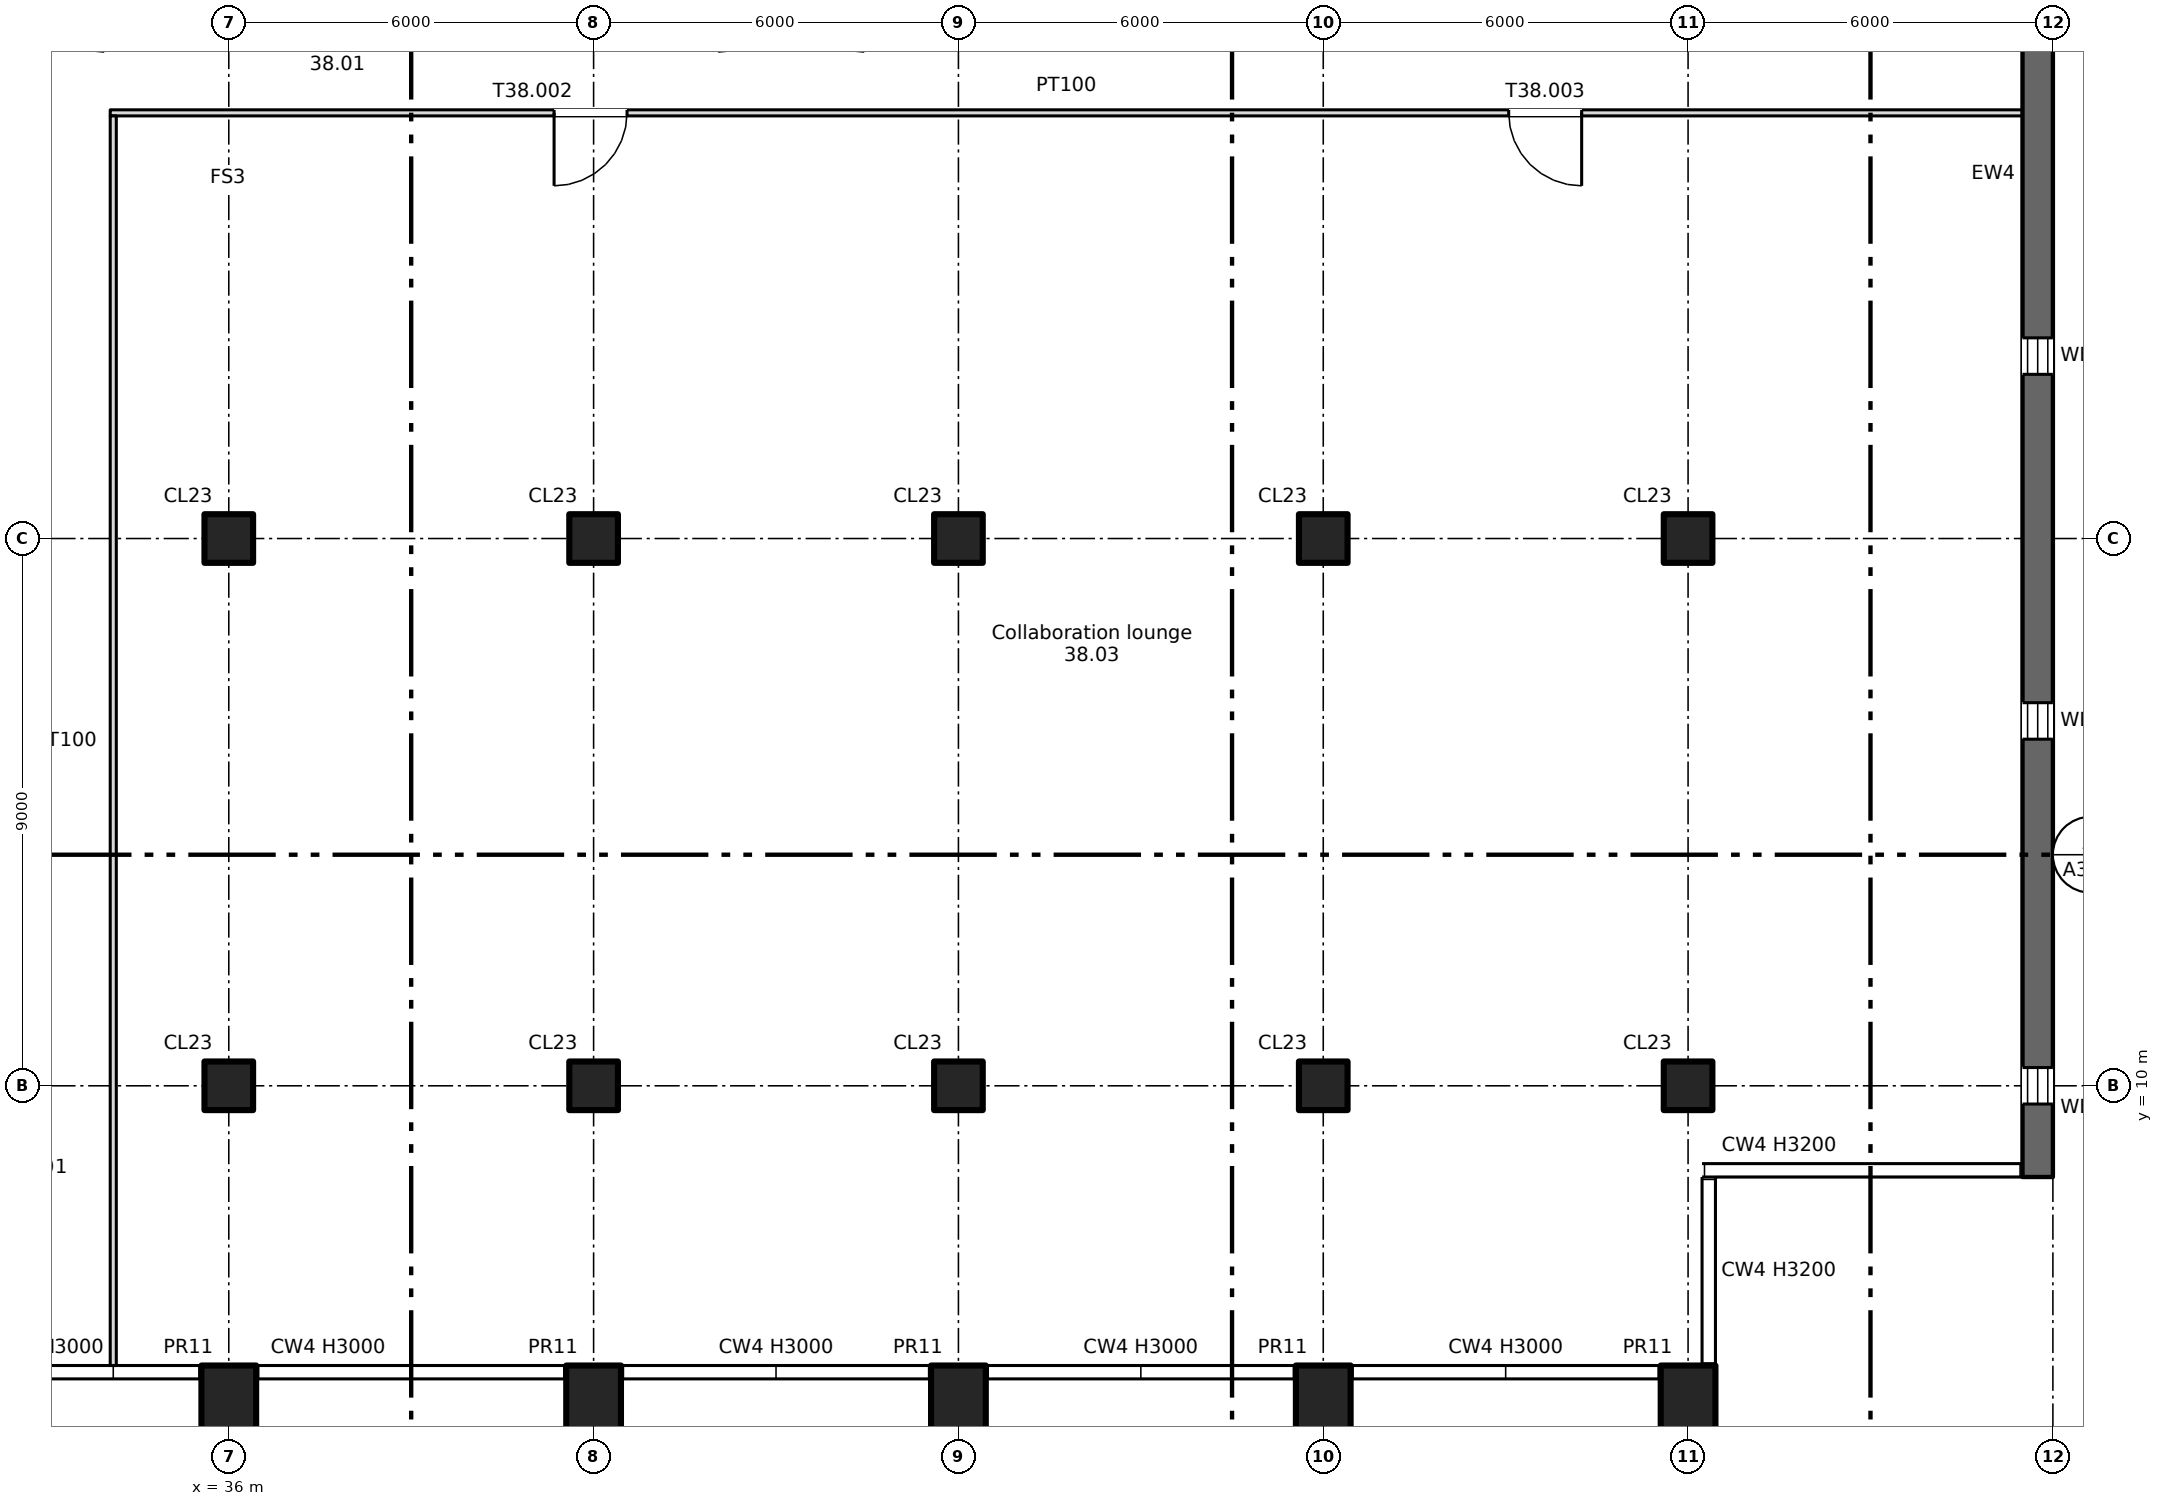
"""IFC4 building model, lengths in metres.
Left out: names, types, materials, properties, quantities, classifications, styles, units other than length and angle.
Written with IfcOpenShell. Run it as: python <this file> out.ifc"""

import sys

from ifc_helpers import new_model, si_unit, direction, frame, frame_2d, origin, origin_2d, place, context, subcontext, project, spatial, rectangle, extrude, element, fill, save


model = new_model("IFC4")
c1 = context("Model", 3, precision=1e-05, world=origin(), true_north=direction((0.0, 1.0)))
c2 = subcontext(c1, "Body", "Model", "MODEL_VIEW")
j1 = project(units=[si_unit("LENGTHUNIT", "METRE"), si_unit("PLANEANGLEUNIT", "RADIAN")], contexts=[c1])
p1 = place(None, origin())
s1 = spatial("IfcSite", under=j1, at=p1, CompositionType="ELEMENT")
p2 = place(p1, origin())
s2 = spatial("IfcBuilding", under=s1, at=p2, CompositionType="ELEMENT")
p3 = place(p2, frame((0.0, 0.0, 262.15)))
s3 = spatial("IfcBuildingStorey", under=s2, at=p3, CompositionType="ELEMENT", Elevation=262.15)
for number, where, z_axis, x_axis in (
    (1, (36.0, 4.7, -0.4), (0.0, 0.0, 1.0), (1.0, 0.0, 0.0)),
    (2, (42.0, 4.7, -0.4), (0.0, 0.0, 1.0), (1.0, 0.0, 0.0)),
    (3, (48.0, 4.7, -0.4), (0.0, 0.0, 1.0), (1.0, 0.0, 0.0)),
    (4, (54.0, 4.7, -0.4), (0.0, 0.0, 1.0), (1.0, 0.0, 0.0)),
    (5, (60.0, 4.7, -0.4), (0.0, 0.0, 1.0), (1.0, 0.0, 0.0)),
):
    element("IfcColumn", number, at=place(p3, frame(where, z_axis=z_axis, x_axis=x_axis)), inside=s3, PredefinedType="COLUMN", context=c2, shape_type="SweptSolid", body=[
        extrude(rectangle(XDim=0.9, YDim=1.4, at=origin_2d()), origin(), (0.0, 0.0, 1.0), 3.6),
    ])
for number, where, z_axis, x_axis in (
    (6, (36.0, 10.0, 0.0), (0.0, 0.0, 1.0), (1.0, 0.0, 0.0)),
    (7, (36.0, 19.0, 0.0), (0.0, 0.0, 1.0), (1.0, 0.0, 0.0)),
    (8, (42.0, 10.0, 0.0), (0.0, 0.0, 1.0), (1.0, 0.0, 0.0)),
    (9, (42.0, 19.0, 0.0), (0.0, 0.0, 1.0), (1.0, 0.0, 0.0)),
    (10, (48.0, 10.0, 0.0), (0.0, 0.0, 1.0), (1.0, 0.0, 0.0)),
    (11, (48.0, 19.0, 0.0), (0.0, 0.0, 1.0), (1.0, 0.0, 0.0)),
    (12, (54.0, 10.0, 0.0), (0.0, 0.0, 1.0), (1.0, 0.0, 0.0)),
    (13, (54.0, 19.0, 0.0), (0.0, 0.0, 1.0), (1.0, 0.0, 0.0)),
    (14, (60.0, 10.0, 0.0), (0.0, 0.0, 1.0), (1.0, 0.0, 0.0)),
    (15, (60.0, 19.0, 0.0), (0.0, 0.0, 1.0), (1.0, 0.0, 0.0)),
):
    element("IfcColumn", number, at=place(p3, frame(where, z_axis=z_axis, x_axis=x_axis)), inside=s3, PredefinedType="COLUMN", context=c2, shape_type="SweptSolid", body=[
        extrude(rectangle(XDim=0.8, YDim=0.8, at=origin_2d()), origin(), (0.0, 0.0, 1.0), 3.2),
    ])
p4 = place(p3, frame((65.75, 8.5, 0.0), z_axis=(0.0, 0.0, 1.0), x_axis=(0.0, 1.0, 0.0)))
e16 = element("IfcWall", 16, at=p4, inside=s3, PredefinedType="SHEAR", context=c2, shape_type="SweptSolid", body=[
    extrude(rectangle(XDim=33.0, YDim=0.5, at=frame_2d((16.5, 0.0))), origin(), (0.0, 0.0, 1.0), 3.2),
])
p5 = place(p4, frame((1.2, 0.0, 0.6)))
e17 = element("IfcOpeningElement", 17, at=p5, cuts=e16, PredefinedType="OPENING", context=c2, shape_type="SweptSolid", body=[
    extrude(rectangle(XDim=0.6, YDim=2.4, at=frame_2d((0.3, 1.2))), frame((0.0, 0.26, 0.0), z_axis=(0.0, -1.0, 0.0), x_axis=(1.0, 0.0, 0.0)), (0.0, 0.0, 1.0), 0.52),
])
p6 = place(p4, frame((7.2, 0.0, 0.6)))
e18 = element("IfcOpeningElement", 18, at=p6, cuts=e16, PredefinedType="OPENING", context=c2, shape_type="SweptSolid", body=[
    extrude(rectangle(XDim=0.6, YDim=2.4, at=frame_2d((0.3, 1.2))), frame((0.0, 0.26, 0.0), z_axis=(0.0, -1.0, 0.0), x_axis=(1.0, 0.0, 0.0)), (0.0, 0.0, 1.0), 0.52),
])
p7 = place(p4, frame((13.2, 0.0, 0.6)))
e19 = element("IfcOpeningElement", 19, at=p7, cuts=e16, PredefinedType="OPENING", context=c2, shape_type="SweptSolid", body=[
    extrude(rectangle(XDim=0.6, YDim=2.4, at=frame_2d((0.3, 1.2))), frame((0.0, 0.26, 0.0), z_axis=(0.0, -1.0, 0.0), x_axis=(1.0, 0.0, 0.0)), (0.0, 0.0, 1.0), 0.52),
])
p8 = place(p3, frame((34.05, 26.0, 0.0), z_axis=(0.0, 0.0, 1.0), x_axis=(1.0, 0.0, 0.0)))
e20 = element("IfcWall", 20, at=p8, inside=s3, PredefinedType="PARTITIONING", context=c2, shape_type="SweptSolid", body=[
    extrude(rectangle(XDim=31.45, YDim=0.1, at=frame_2d((15.725, 0.0))), origin(), (0.0, 0.0, 1.0), 3.2),
])
p9 = place(p8, frame((7.3, 0.0, 0.0)))
e21 = element("IfcOpeningElement", 21, at=p9, cuts=e20, PredefinedType="OPENING", context=c2, shape_type="SweptSolid", body=[
    extrude(rectangle(XDim=1.2, YDim=2.1, at=frame_2d((0.6, 1.05))), frame((0.0, 0.06, 0.0), z_axis=(0.0, -1.0, 0.0), x_axis=(1.0, 0.0, 0.0)), (0.0, 0.0, 1.0), 0.12),
])
p10 = place(p8, frame((23.0, 0.0, 0.0)))
e22 = element("IfcOpeningElement", 22, at=p10, cuts=e20, PredefinedType="OPENING", context=c2, shape_type="SweptSolid", body=[
    extrude(rectangle(XDim=1.2, YDim=2.1, at=frame_2d((0.6, 1.05))), frame((0.0, 0.06, 0.0), z_axis=(0.0, -1.0, 0.0), x_axis=(1.0, 0.0, 0.0)), (0.0, 0.0, 1.0), 0.12),
])
p11 = place(p3, frame((34.1, 5.4, 0.0), z_axis=(0.0, 0.0, 1.0), x_axis=(0.0, 1.0, 0.0)))
e23 = element("IfcWall", 23, at=p11, inside=s3, PredefinedType="PARTITIONING", context=c2, shape_type="SweptSolid", body=[
    extrude(rectangle(XDim=20.55, YDim=0.1, at=frame_2d((10.275, 0.0))), origin(), (0.0, 0.0, 1.0), 3.2),
])
p12 = place(p5, origin())
e24 = element("IfcWindow", 24, at=p12, inside=s3, PartitioningType="SINGLE_PANEL", PredefinedType="WINDOW", context=c2, shape_type="SweptSolid", body=[
    extrude(rectangle(XDim=0.6, YDim=2.4, at=frame_2d((0.3, 1.2))), frame((0.0, 0.03, 0.0), z_axis=(0.0, -1.0, 0.0), x_axis=(1.0, 0.0, 0.0)), (0.0, 0.0, 1.0), 0.06),
])
fill(e17, e24)
p13 = place(p6, origin())
e25 = element("IfcWindow", 25, at=p13, inside=s3, PartitioningType="SINGLE_PANEL", PredefinedType="WINDOW", context=c2, shape_type="SweptSolid", body=[
    extrude(rectangle(XDim=0.6, YDim=2.4, at=frame_2d((0.3, 1.2))), frame((0.0, 0.03, 0.0), z_axis=(0.0, -1.0, 0.0), x_axis=(1.0, 0.0, 0.0)), (0.0, 0.0, 1.0), 0.06),
])
fill(e18, e25)
p14 = place(p7, origin())
e26 = element("IfcWindow", 26, at=p14, inside=s3, PartitioningType="SINGLE_PANEL", PredefinedType="WINDOW", context=c2, shape_type="SweptSolid", body=[
    extrude(rectangle(XDim=0.6, YDim=2.4, at=frame_2d((0.3, 1.2))), frame((0.0, 0.03, 0.0), z_axis=(0.0, -1.0, 0.0), x_axis=(1.0, 0.0, 0.0)), (0.0, 0.0, 1.0), 0.06),
])
fill(e19, e26)
p15 = place(p9, origin())
e27 = element("IfcDoor", 27, at=p15, inside=s3, OperationType="SINGLE_SWING_LEFT", PredefinedType="DOOR", context=c2, shape_type="SweptSolid", body=[
    extrude(rectangle(XDim=1.2, YDim=2.1, at=frame_2d((0.6, 1.05))), frame((0.0, 0.025, 0.0), z_axis=(0.0, -1.0, 0.0), x_axis=(1.0, 0.0, 0.0)), (0.0, 0.0, 1.0), 0.05),
])
fill(e21, e27)
p16 = place(p10, origin())
e28 = element("IfcDoor", 28, at=p16, inside=s3, OperationType="SINGLE_SWING_RIGHT", PredefinedType="DOOR", context=c2, shape_type="SweptSolid", body=[
    extrude(rectangle(XDim=1.2, YDim=2.1, at=frame_2d((0.6, 1.05))), frame((0.0, 0.025, 0.0), z_axis=(0.0, -1.0, 0.0), x_axis=(1.0, 0.0, 0.0)), (0.0, 0.0, 1.0), 0.05),
])
fill(e22, e28)
save(model, sys.argv[1])
